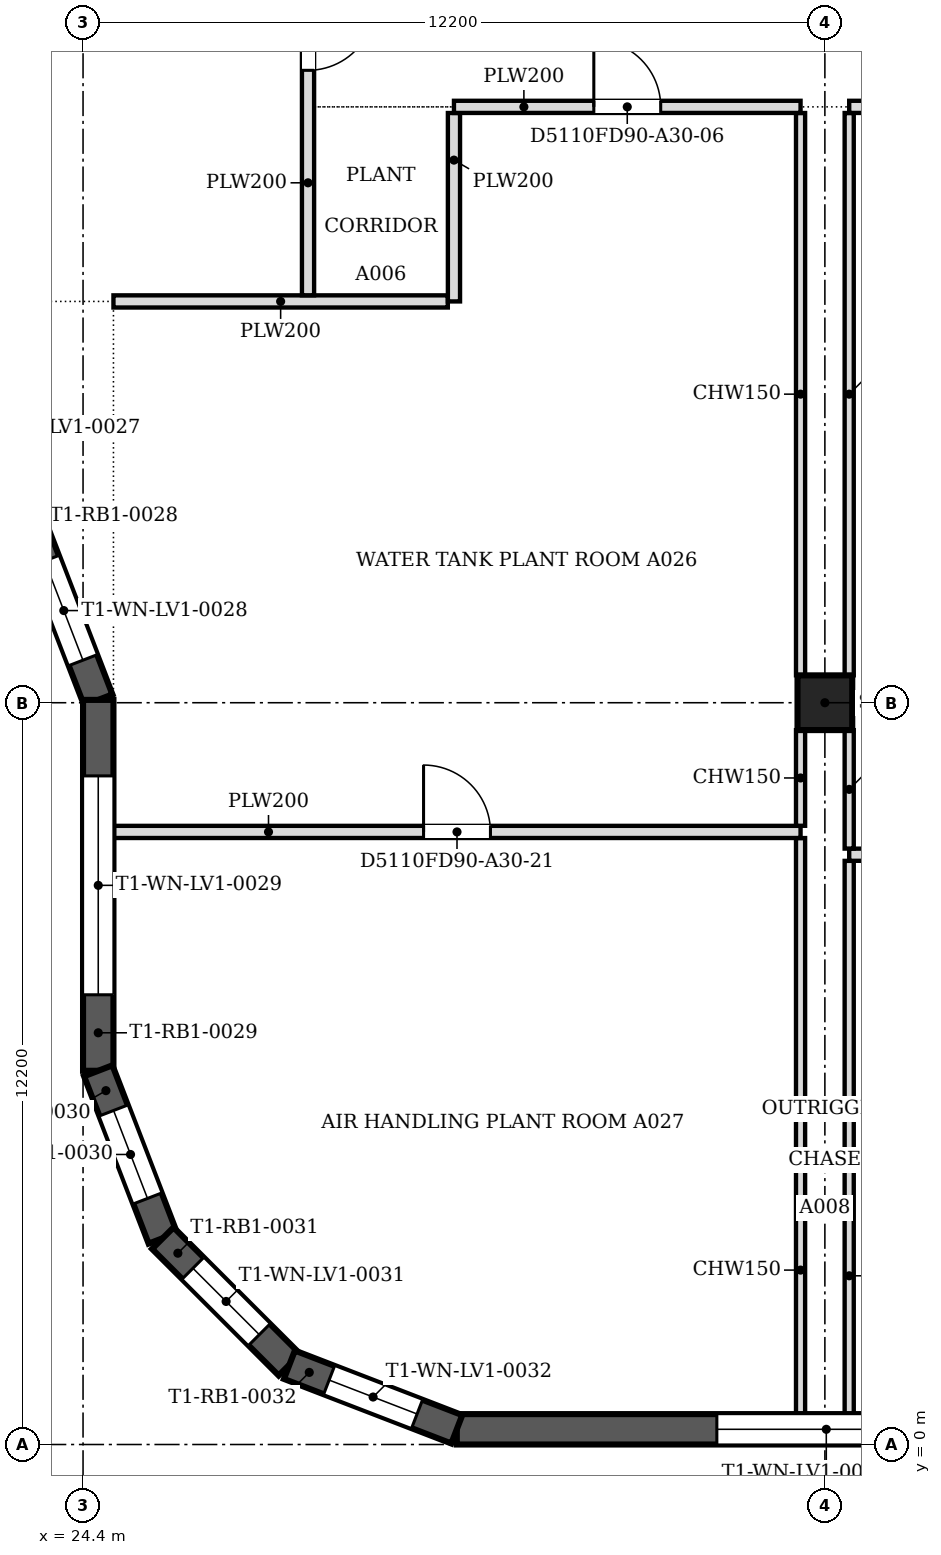
"""IFC4 building model, lengths in metres.
Left out: names, types, materials, properties, quantities, classifications, styles, units other than length and angle.
Written with IfcOpenShell. Run it as: python <this file> out.ifc"""

import sys

from ifc_helpers import new_model, si_unit, direction, frame, frame_2d, origin, origin_2d, place, context, subcontext, project, spatial, polyline, rectangle, outline, extrude, faceted_brep, source, transform, mapped, element, fill, save


model = new_model("IFC4")
c1 = context("Model", 3, precision=1e-05, world=origin(), true_north=direction((0.0, 1.0)))
c2 = subcontext(c1, "Body", "Model", "MODEL_VIEW")
j1 = project(units=[si_unit("LENGTHUNIT", "METRE"), si_unit("PLANEANGLEUNIT", "RADIAN")], contexts=[c1])
p1 = place(None, origin())
s1 = spatial("IfcSite", under=j1, at=p1, CompositionType="ELEMENT")
p2 = place(p1, origin())
s2 = spatial("IfcBuilding", under=s1, at=p2, CompositionType="ELEMENT")
p3 = place(p2, frame((0.0, 0.0, 63.8)))
s3 = spatial("IfcBuildingStorey", under=s2, at=p3, CompositionType="ELEMENT", Elevation=63.8)
p4 = place(p3, frame((36.6, 12.2, 0.0), z_axis=(0.0, 0.0, 1.0), x_axis=(1.0, 0.0, 0.0)))
e1 = element("IfcColumn", 1, at=p4, inside=s3, PredefinedType="COLUMN", context=c2, shape_type="SweptSolid", body=[
    extrude(rectangle(XDim=0.9, YDim=0.9, at=origin_2d()), origin(), (0.0, 0.0, 1.0), 4.6),
])
m1 = source(origin(), c2, "Body", "Brep", [
    faceted_brep([(0.0, -0.25, 0.0), (12.154, -0.25, 0.0), (12.154, -0.25, 4.8), (0.0, -0.25, 4.8), (0.047, 0.25, 4.8), (12.154, 0.25, 4.8), (12.154, 0.25, 0.0), (0.047, 0.25, 0.0), (0.0, 0.0, 0.0), (0.0, 0.0, 4.8)], [[[0, 1, 2, 3]], [[4, 5, 6, 7]], [[7, 6, 1, 0, 8]], [[5, 4, 9, 3, 2]], [[8, 0, 3, 9]], [[7, 8, 9, 4]], [[1, 6, 5, 2]]]),
])
p5 = place(p3, frame((30.547, 0.25, 0.0), z_axis=(0.0, 0.0, 1.0), x_axis=(1.0, 0.0, 0.0)))
e2 = element("IfcWall", 2, at=p5, inside=s3, PredefinedType="SOLIDWALL", context=c2, shape_type="MappedRepresentation", body=[
    mapped(m1, transform((0.0, 0.0, 0.0), scale=1.0)),
])
m2 = source(origin(), c2, "Body", "SweptSolid", [
    extrude(outline(polyline([(4.277, 0.8), (7.877, 0.8), (7.877, 4.0), (4.277, 4.0), (4.277, 0.8)])), frame((0.0, 0.26, 0.0), z_axis=(0.0, -1.0, 0.0), x_axis=(1.0, 0.0, 0.0)), (0.0, 0.0, 1.0), 0.52),
])
p6 = place(p5, origin())
e3 = element("IfcOpeningElement", 3, at=p6, cuts=e2, PredefinedType="OPENING", context=c2, shape_type="MappedRepresentation", body=[
    mapped(m2, transform((0.0, 0.0, 0.0), scale=1.0)),
])
m3 = source(origin(), c2, "Body", "Brep", [
    faceted_brep([(0.053, -0.25, 0.0), (3.103, -0.25, 0.0), (3.103, -0.25, 4.8), (0.053, -0.25, 4.8), (0.0, 0.25, 4.8), (3.149, 0.25, 4.8), (3.149, 0.25, 0.0), (0.0, 0.25, 0.0), (3.149, -0.0, 0.0), (0.0, 0.0, 0.0), (3.149, -0.0, 4.8), (0.0, 0.0, 4.8)], [[[0, 1, 2, 3]], [[4, 5, 6, 7]], [[7, 6, 8, 1, 0, 9]], [[6, 5, 10, 8]], [[5, 4, 11, 3, 2, 10]], [[4, 7, 9, 11]], [[9, 0, 3, 11]], [[1, 8, 10, 2]]]),
])
p7 = place(p3, frame((23.517, 15.185, 0.0), z_axis=(0.0, 0.0, 1.0), x_axis=(0.359841220347, -0.933013556246, 0.0)))
e4 = element("IfcWall", 4, at=p7, inside=s3, PredefinedType="SOLIDWALL", context=c2, shape_type="MappedRepresentation", body=[
    mapped(m3, transform((0.0, 0.0, 0.0), scale=1.0)),
])
m4 = source(origin(), c2, "Body", "SweptSolid", [
    extrude(outline(polyline([(0.7, 0.8), (2.449, 0.8), (2.449, 4.0), (0.7, 4.0), (0.7, 0.8)])), frame((0.0, 0.26, 0.0), z_axis=(0.0, -1.0, 0.0), x_axis=(1.0, 0.0, 0.0)), (0.0, 0.0, 1.0), 0.52),
])
p8 = place(p7, origin())
e5 = element("IfcOpeningElement", 5, at=p8, cuts=e4, PredefinedType="OPENING", context=c2, shape_type="MappedRepresentation", body=[
    mapped(m4, transform((0.0, 0.0, 0.0), scale=1.0)),
])
m5 = source(origin(), c2, "Body", "Brep", [
    faceted_brep([(0.047, -0.25, 0.0), (6.1, -0.25, 0.0), (6.1, -0.25, 4.8), (0.047, -0.25, 4.8), (0.0, 0.25, 4.8), (6.053, 0.25, 4.8), (6.053, 0.25, 0.0), (0.0, 0.25, 0.0), (6.1, -0.0, 0.0), (0.0, 0.0, 0.0), (6.1, -0.0, 4.8), (0.0, 0.0, 4.8)], [[[0, 1, 2, 3]], [[4, 5, 6, 7]], [[7, 6, 8, 1, 0, 9]], [[10, 2, 1, 8]], [[5, 4, 11, 3, 2, 10]], [[4, 7, 9, 11]], [[9, 0, 3, 11]], [[8, 6, 5, 10]]]),
])
p9 = place(p3, frame((24.65, 12.247, 0.0), z_axis=(0.0, 0.0, 1.0), x_axis=(0.0, -1.0, 0.0)))
e6 = element("IfcWall", 6, at=p9, inside=s3, PredefinedType="SOLIDWALL", context=c2, shape_type="MappedRepresentation", body=[
    mapped(m5, transform((0.0, 0.0, 0.0), scale=1.0)),
])
m6 = source(origin(), c2, "Body", "SweptSolid", [
    extrude(outline(polyline([(1.25, 0.8), (4.85, 0.8), (4.85, 4.0), (1.25, 4.0), (1.25, 0.8)])), frame((0.0, 0.26, 0.0), z_axis=(0.0, -1.0, 0.0), x_axis=(1.0, 0.0, 0.0)), (0.0, 0.0, 1.0), 0.52),
])
p10 = place(p9, origin())
e7 = element("IfcOpeningElement", 7, at=p10, cuts=e6, PredefinedType="OPENING", context=c2, shape_type="MappedRepresentation", body=[
    mapped(m6, transform((0.0, 0.0, 0.0), scale=1.0)),
])
m7 = source(origin(), c2, "Body", "Brep", [
    faceted_brep([(0.0, -0.25, 0.0), (2.95, -0.25, 0.0), (2.95, -0.25, 4.8), (0.0, -0.25, 4.8), (0.047, 0.25, 4.8), (2.898, 0.25, 4.8), (2.898, 0.25, 0.0), (0.047, 0.25, 0.0), (2.95, 0.0, 0.0), (0.0, 0.0, 0.0), (2.95, 0.0, 4.8), (0.0, 0.0, 4.8)], [[[0, 1, 2, 3]], [[4, 5, 6, 7]], [[7, 6, 8, 1, 0, 9]], [[10, 2, 1, 8]], [[5, 4, 11, 3, 2, 10]], [[9, 0, 3, 11]], [[7, 9, 11, 4]], [[8, 6, 5, 10]]]),
])
p11 = place(p3, frame((24.65, 6.146, 0.0), z_axis=(0.0, 0.0, 1.0), x_axis=(0.359949242603, -0.932971887438, 0.0)))
e8 = element("IfcWall", 8, at=p11, inside=s3, PredefinedType="SOLIDWALL", context=c2, shape_type="MappedRepresentation", body=[
    mapped(m7, transform((0.0, 0.0, 0.0), scale=1.0)),
])
m8 = source(origin(), c2, "Body", "SweptSolid", [
    extrude(outline(polyline([(0.7, 0.8), (2.25, 0.8), (2.25, 4.0), (0.7, 4.0), (0.7, 0.8)])), frame((0.0, 0.26, 0.0), z_axis=(0.0, -1.0, 0.0), x_axis=(1.0, 0.0, 0.0)), (0.0, 0.0, 1.0), 0.52),
])
p12 = place(p11, origin())
e9 = element("IfcOpeningElement", 9, at=p12, cuts=e8, PredefinedType="OPENING", context=c2, shape_type="MappedRepresentation", body=[
    mapped(m8, transform((0.0, 0.0, 0.0), scale=1.0)),
])
m9 = source(origin(), c2, "Body", "Brep", [
    faceted_brep([(0.0, -0.25, 0.0), (2.944, -0.25, 0.0), (2.944, -0.25, 4.8), (0.0, -0.25, 4.8), (0.053, 0.25, 4.8), (2.891, 0.25, 4.8), (2.891, 0.25, 0.0), (0.053, 0.25, 0.0), (2.944, 0.0, 0.0), (0.0, 0.0, 0.0), (2.944, 0.0, 4.8), (0.0, 0.0, 4.8)], [[[0, 1, 2, 3]], [[4, 5, 6, 7]], [[7, 6, 8, 1, 0, 9]], [[10, 2, 1, 8]], [[5, 4, 11, 3, 2, 10]], [[9, 0, 3, 11]], [[7, 9, 11, 4]], [[8, 6, 5, 10]]]),
])
p13 = place(p3, frame((25.712, 3.394, 0.0), z_axis=(0.0, 0.0, 1.0), x_axis=(0.707106781187, -0.707106781187, 0.0)))
e10 = element("IfcWall", 10, at=p13, inside=s3, PredefinedType="SOLIDWALL", context=c2, shape_type="MappedRepresentation", body=[
    mapped(m9, transform((0.0, 0.0, 0.0), scale=1.0)),
])
m10 = source(origin(), c2, "Body", "SweptSolid", [
    extrude(outline(polyline([(0.7, 0.8), (2.244, 0.8), (2.244, 4.0), (0.7, 4.0), (0.7, 0.8)])), frame((0.0, 0.26, 0.0), z_axis=(0.0, -1.0, 0.0), x_axis=(1.0, 0.0, 0.0)), (0.0, 0.0, 1.0), 0.52),
])
p14 = place(p13, origin())
e11 = element("IfcOpeningElement", 11, at=p14, cuts=e10, PredefinedType="OPENING", context=c2, shape_type="MappedRepresentation", body=[
    mapped(m10, transform((0.0, 0.0, 0.0), scale=1.0)),
])
m11 = source(origin(), c2, "Body", "Brep", [
    faceted_brep([(0.0, -0.25, 0.0), (2.95, -0.25, 0.0), (2.95, -0.25, 4.8), (0.0, -0.25, 4.8), (0.053, 0.25, 4.8), (2.904, 0.25, 4.8), (2.904, 0.25, 0.0), (0.053, 0.25, 0.0), (2.95, 0.0, 0.0), (0.0, 0.0, 0.0), (2.95, 0.0, 4.8), (0.0, 0.0, 4.8)], [[[0, 1, 2, 3]], [[4, 5, 6, 7]], [[7, 6, 8, 1, 0, 9]], [[10, 2, 1, 8]], [[5, 4, 11, 3, 2, 10]], [[9, 0, 3, 11]], [[7, 9, 11, 4]], [[8, 6, 5, 10]]]),
])
p15 = place(p3, frame((27.794, 1.312, 0.0), z_axis=(0.0, 0.0, 1.0), x_axis=(0.932971887438, -0.359949242603, 0.0)))
e12 = element("IfcWall", 12, at=p15, inside=s3, PredefinedType="SOLIDWALL", context=c2, shape_type="MappedRepresentation", body=[
    mapped(m11, transform((0.0, 0.0, 0.0), scale=1.0)),
])
p16 = place(p15, origin())
e13 = element("IfcOpeningElement", 13, at=p16, cuts=e12, PredefinedType="OPENING", context=c2, shape_type="MappedRepresentation", body=[
    mapped(m8, transform((0.0, 0.0, 0.0), scale=1.0)),
])
p17 = place(p3, frame((36.2, 0.5, 0.0), z_axis=(0.0, 0.0, 1.0), x_axis=(0.0, 1.0, 0.0)))
e14 = element("IfcWall", 14, at=p17, inside=s3, PredefinedType="PARTITIONING", context=c2, shape_type="SweptSolid", body=[
    extrude(rectangle(XDim=9.474, YDim=0.15, at=frame_2d((4.737, 0.0))), origin(), (0.0, 0.0, 1.0), 4.067),
])
p18 = place(p3, frame((37.0, 0.5, 0.0), z_axis=(0.0, 0.0, 1.0), x_axis=(0.0, 1.0, 0.0)))
e15 = element("IfcWall", 15, at=p18, inside=s3, PredefinedType="PARTITIONING", context=c2, shape_type="SweptSolid", body=[
    extrude(rectangle(XDim=9.099, YDim=0.15, at=frame_2d((4.55, 0.0))), origin(), (0.0, 0.0, 1.0), 4.067),
])
p19 = place(p3, frame((43.299, 9.7, 0.0), z_axis=(0.0, 0.0, 1.0), x_axis=(-1.0, 0.0, 0.0)))
e16 = element("IfcWall", 16, at=p19, inside=s3, PredefinedType="PARTITIONING", context=c2, shape_type="SweptSolid", body=[
    extrude(rectangle(XDim=6.299, YDim=0.2, at=frame_2d((3.149, 0.0))), origin(), (0.0, 0.0, 1.0), 4.067),
])
m12 = source(origin(), c2, "Body", "SweptSolid", [
    extrude(rectangle(XDim=1.1, YDim=2.1, at=frame_2d((0.55, 1.05))), frame((0.0, 0.11, 0.0), z_axis=(0.0, -1.0, 0.0), x_axis=(1.0, 0.0, 0.0)), (0.0, 0.0, 1.0), 0.22),
])
p20 = place(p19, frame((2.599, 0.0, 0.0)))
e17 = element("IfcOpeningElement", 17, at=p20, cuts=e16, PredefinedType="OPENING", context=c2, shape_type="MappedRepresentation", body=[
    mapped(m12, transform((0.0, 0.0, 0.0), scale=1.0)),
])
p21 = place(p3, frame((37.0, 9.801, 0.0), z_axis=(0.0, 0.0, 1.0), x_axis=(0.0, 1.0, 0.0)))
e18 = element("IfcWall", 18, at=p21, inside=s3, PredefinedType="PARTITIONING", context=c2, shape_type="SweptSolid", body=[
    extrude(rectangle(XDim=1.948, YDim=0.15, at=frame_2d((0.974, 0.0))), origin(), (0.0, 0.0, 1.0), 4.067),
])
p22 = place(p3, frame((36.2, 10.075, 0.0), z_axis=(0.0, 0.0, 1.0), x_axis=(-1.0, 0.0, 0.0)))
e19 = element("IfcWall", 19, at=p22, inside=s3, PredefinedType="PARTITIONING", context=c2, shape_type="SweptSolid", body=[
    extrude(rectangle(XDim=11.3, YDim=0.2, at=frame_2d((5.65, 0.0))), origin(), (0.0, 0.0, 1.0), 4.067),
])
p23 = place(p22, frame((5.1, 0.0, 0.0)))
e20 = element("IfcOpeningElement", 20, at=p23, cuts=e19, PredefinedType="OPENING", context=c2, shape_type="MappedRepresentation", body=[
    mapped(m12, transform((0.0, 0.0, 0.0), scale=1.0)),
])
p24 = place(p3, frame((36.2, 10.176, 0.0), z_axis=(0.0, 0.0, 1.0), x_axis=(0.0, 1.0, 0.0)))
e21 = element("IfcWall", 21, at=p24, inside=s3, PredefinedType="PARTITIONING", context=c2, shape_type="SweptSolid", body=[
    extrude(rectangle(XDim=1.573, YDim=0.15, at=frame_2d((0.787, 0.0))), origin(), (0.0, 0.0, 1.0), 4.067),
])
for number, where, z_axis, x_axis in (
    (22, (36.2, 12.651, 0.0), (0.0, 0.0, 1.0), (0.0, 1.0, 0.0)),
    (23, (37.0, 12.651, 0.0), (0.0, 0.0, 1.0), (0.0, 1.0, 0.0)),
):
    element("IfcWall", number, at=place(p3, frame(where, z_axis=z_axis, x_axis=x_axis)), inside=s3, PredefinedType="PARTITIONING", context=c2, shape_type="SweptSolid", body=[
        extrude(rectangle(XDim=9.248, YDim=0.15, at=frame_2d((4.624, 0.0))), origin(), (0.0, 0.0, 1.0), 4.067),
    ])
p25 = place(p3, frame((24.9, 18.8, 0.0), z_axis=(0.0, 0.0, 1.0), x_axis=(1.0, 0.0, 0.0)))
e24 = element("IfcWall", 24, at=p25, inside=s3, PredefinedType="PARTITIONING", context=c2, shape_type="SweptSolid", body=[
    extrude(rectangle(XDim=5.499, YDim=0.2, at=frame_2d((2.75, 0.0))), origin(), (0.0, 0.0, 1.0), 4.067),
])
p26 = place(p3, frame((30.5, 18.8, 0.0), z_axis=(0.0, 0.0, 1.0), x_axis=(0.0, 1.0, 0.0)))
e25 = element("IfcWall", 25, at=p26, inside=s3, PredefinedType="PARTITIONING", context=c2, shape_type="SweptSolid", body=[
    extrude(rectangle(XDim=3.099, YDim=0.2, at=frame_2d((1.549, 0.0))), origin(), (0.0, 0.0, 1.0), 4.067),
])
p27 = place(p3, frame((28.1, 18.901, 0.0), z_axis=(0.0, 0.0, 1.0), x_axis=(0.0, 1.0, 0.0)))
e26 = element("IfcWall", 26, at=p27, inside=s3, PredefinedType="PARTITIONING", context=c2, shape_type="SweptSolid", body=[
    extrude(rectangle(XDim=5.398, YDim=0.2, at=frame_2d((2.699, 0.0))), origin(), (0.0, 0.0, 1.0), 4.067),
])
p28 = place(p27, frame((3.7, 0.0, 0.0)))
e27 = element("IfcOpeningElement", 27, at=p28, cuts=e26, PredefinedType="OPENING", context=c2, shape_type="MappedRepresentation", body=[
    mapped(m12, transform((0.0, 0.0, 0.0), scale=1.0)),
])
p29 = place(p3, frame((36.2, 22.0, 0.0), z_axis=(0.0, 0.0, 1.0), x_axis=(-1.0, 0.0, 0.0)))
e28 = element("IfcWall", 28, at=p29, inside=s3, PredefinedType="PARTITIONING", context=c2, shape_type="SweptSolid", body=[
    extrude(rectangle(XDim=5.7, YDim=0.2, at=frame_2d((2.85, 0.0))), origin(), (0.0, 0.0, 1.0), 4.067),
])
p30 = place(p29, frame((2.3, 0.0, 0.0)))
e29 = element("IfcOpeningElement", 29, at=p30, cuts=e28, PredefinedType="OPENING", context=c2, shape_type="MappedRepresentation", body=[
    mapped(m12, transform((0.0, 0.0, 0.0), scale=1.0)),
])
p31 = place(p3, frame((43.299, 22.0, 0.0), z_axis=(0.0, 0.0, 1.0), x_axis=(-1.0, 0.0, 0.0)))
e30 = element("IfcWall", 30, at=p31, inside=s3, PredefinedType="PARTITIONING", context=c2, shape_type="SweptSolid", body=[
    extrude(rectangle(XDim=6.299, YDim=0.2, at=frame_2d((3.149, 0.0))), origin(), (0.0, 0.0, 1.0), 4.067),
])
p32 = place(p31, frame((2.599, 0.0, 0.0)))
e31 = element("IfcOpeningElement", 31, at=p32, cuts=e30, PredefinedType="OPENING", context=c2, shape_type="MappedRepresentation", body=[
    mapped(m12, transform((0.0, 0.0, 0.0), scale=1.0)),
])
m13 = source(origin(), c2, "Body", "SweptSolid", [
    extrude(outline(polyline([(4.277, 0.8), (7.877, 0.8), (7.877, 4.0), (4.277, 4.0), (4.277, 0.8)])), frame((0.0, 0.03, 0.0), z_axis=(0.0, -1.0, 0.0), x_axis=(1.0, 0.0, 0.0)), (0.0, 0.0, 1.0), 0.06),
])
p33 = place(p6, origin())
e32 = element("IfcWindow", 32, at=p33, inside=s3, PartitioningType="USERDEFINED", PredefinedType="WINDOW", context=c2, shape_type="MappedRepresentation", body=[
    mapped(m13, transform((0.0, 0.0, 0.0), scale=1.0)),
])
fill(e3, e32)
m14 = source(origin(), c2, "Body", "SweptSolid", [
    extrude(outline(polyline([(0.7, 0.8), (2.449, 0.8), (2.449, 4.0), (0.7, 4.0), (0.7, 0.8)])), frame((0.0, 0.03, 0.0), z_axis=(0.0, -1.0, 0.0), x_axis=(1.0, 0.0, 0.0)), (0.0, 0.0, 1.0), 0.06),
])
p34 = place(p8, origin())
e33 = element("IfcWindow", 33, at=p34, inside=s3, PartitioningType="USERDEFINED", PredefinedType="WINDOW", context=c2, shape_type="MappedRepresentation", body=[
    mapped(m14, transform((0.0, 0.0, 0.0), scale=1.0)),
])
fill(e5, e33)
m15 = source(origin(), c2, "Body", "SweptSolid", [
    extrude(outline(polyline([(1.25, 0.8), (4.85, 0.8), (4.85, 4.0), (1.25, 4.0), (1.25, 0.8)])), frame((0.0, 0.03, 0.0), z_axis=(0.0, -1.0, 0.0), x_axis=(1.0, 0.0, 0.0)), (0.0, 0.0, 1.0), 0.06),
])
p35 = place(p10, origin())
e34 = element("IfcWindow", 34, at=p35, inside=s3, PartitioningType="USERDEFINED", PredefinedType="WINDOW", context=c2, shape_type="MappedRepresentation", body=[
    mapped(m15, transform((0.0, 0.0, 0.0), scale=1.0)),
])
fill(e7, e34)
m16 = source(origin(), c2, "Body", "SweptSolid", [
    extrude(outline(polyline([(0.7, 0.8), (2.25, 0.8), (2.25, 4.0), (0.7, 4.0), (0.7, 0.8)])), frame((0.0, 0.03, 0.0), z_axis=(0.0, -1.0, 0.0), x_axis=(1.0, 0.0, 0.0)), (0.0, 0.0, 1.0), 0.06),
])
p36 = place(p12, origin())
e35 = element("IfcWindow", 35, at=p36, inside=s3, PartitioningType="USERDEFINED", PredefinedType="WINDOW", context=c2, shape_type="MappedRepresentation", body=[
    mapped(m16, transform((0.0, 0.0, 0.0), scale=1.0)),
])
fill(e9, e35)
m17 = source(origin(), c2, "Body", "SweptSolid", [
    extrude(outline(polyline([(0.7, 0.8), (2.244, 0.8), (2.244, 4.0), (0.7, 4.0), (0.7, 0.8)])), frame((0.0, 0.03, 0.0), z_axis=(0.0, -1.0, 0.0), x_axis=(1.0, 0.0, 0.0)), (0.0, 0.0, 1.0), 0.06),
])
p37 = place(p14, origin())
e36 = element("IfcWindow", 36, at=p37, inside=s3, PartitioningType="USERDEFINED", PredefinedType="WINDOW", context=c2, shape_type="MappedRepresentation", body=[
    mapped(m17, transform((0.0, 0.0, 0.0), scale=1.0)),
])
fill(e11, e36)
p38 = place(p16, origin())
e37 = element("IfcWindow", 37, at=p38, inside=s3, PartitioningType="USERDEFINED", PredefinedType="WINDOW", context=c2, shape_type="MappedRepresentation", body=[
    mapped(m16, transform((0.0, 0.0, 0.0), scale=1.0)),
])
fill(e13, e37)
m18 = source(origin(), c2, "Body", "SweptSolid", [
    extrude(rectangle(XDim=1.1, YDim=2.1, at=frame_2d((0.55, 1.05))), frame((0.0, 0.025, 0.0), z_axis=(0.0, -1.0, 0.0), x_axis=(1.0, 0.0, 0.0)), (0.0, 0.0, 1.0), 0.05),
])
p39 = place(p28, origin())
e38 = element("IfcDoor", 38, at=p39, inside=s3, OperationType="SINGLE_SWING_RIGHT", PredefinedType="DOOR", context=c2, shape_type="MappedRepresentation", body=[
    mapped(m18, transform((0.0, 0.0, 0.0), scale=1.0)),
])
fill(e27, e38)
p40 = place(p30, origin())
e39 = element("IfcDoor", 39, at=p40, inside=s3, OperationType="SINGLE_SWING_RIGHT", PredefinedType="DOOR", context=c2, shape_type="MappedRepresentation", body=[
    mapped(m18, transform((0.0, 0.0, 0.0), scale=1.0)),
])
fill(e29, e39)
p41 = place(p23, origin())
e40 = element("IfcDoor", 40, at=p41, inside=s3, OperationType="SINGLE_SWING_RIGHT", PredefinedType="DOOR", context=c2, shape_type="MappedRepresentation", body=[
    mapped(m18, transform((0.0, 0.0, 0.0), scale=1.0)),
])
fill(e20, e40)
save(model, sys.argv[1])
